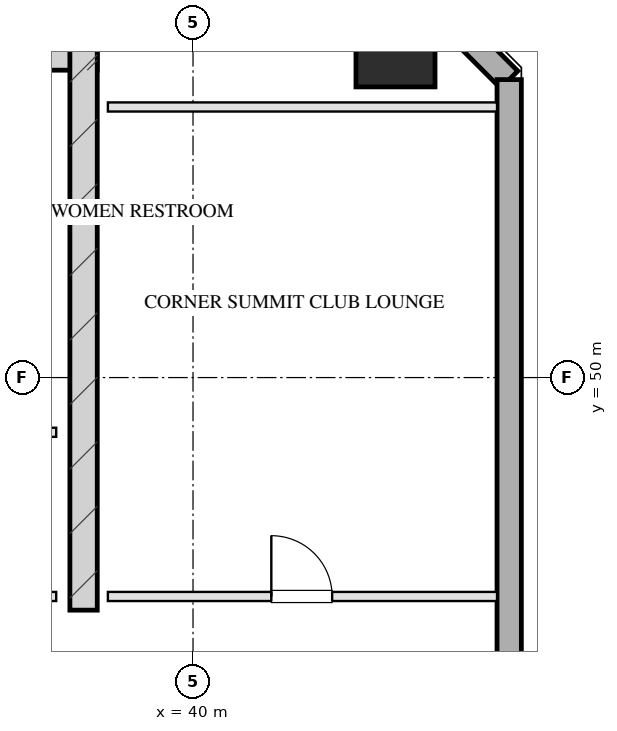
"""IFC4 building model, lengths in metres.
Left out: names, types, materials, properties, quantities, classifications, styles, units other than length and angle.
Written with IfcOpenShell. Run it as: python <this file> out.ifc"""

import sys

from ifc_helpers import new_model, si_unit, direction, frame, frame_2d, origin, origin_2d, place, context, subcontext, project, spatial, rectangle, hollow_rectangle, extrude, element, fill, save


model = new_model("IFC4")
c1 = context("Model", 3, precision=1e-05, world=origin(), true_north=direction((0.0, 1.0)))
c2 = subcontext(c1, "Body", "Model", "MODEL_VIEW")
j1 = project(units=[si_unit("LENGTHUNIT", "METRE"), si_unit("PLANEANGLEUNIT", "RADIAN")], contexts=[c1])
p1 = place(None, origin())
s1 = spatial("IfcSite", under=j1, at=p1, CompositionType="ELEMENT")
p2 = place(p1, origin())
s2 = spatial("IfcBuilding", under=s1, at=p2, CompositionType="ELEMENT")
p3 = place(p2, frame((0.0, 0.0, 272.8)))
s3 = spatial("IfcBuildingStorey", under=s2, at=p3, CompositionType="ELEMENT", Elevation=272.8)
p4 = place(p3, frame((21.575, 55.28, 0.0), z_axis=(0.0, 0.0, 1.0), x_axis=(1.0, 0.0, 0.0)))
e1 = element("IfcWall", 1, at=p4, inside=s3, PredefinedType="SHEAR", context=c2, shape_type="SweptSolid", body=[
    extrude(rectangle(XDim=16.85, YDim=0.45, at=frame_2d((8.425, 0.0))), origin(), (0.0, 0.0, 1.0), 3.2),
])
p5 = place(p3, frame((38.2, 46.175, 0.0), z_axis=(0.0, 0.0, 1.0), x_axis=(0.0, 1.0, 0.0)))
e2 = element("IfcWall", 2, at=p5, inside=s3, PredefinedType="SHEAR", context=c2, shape_type="SweptSolid", body=[
    extrude(rectangle(XDim=9.33, YDim=0.45, at=frame_2d((4.665, 0.0))), origin(), (0.0, 0.0, 1.0), 3.2),
])
p6 = place(p3, frame((43.33, 55.43, 0.0), z_axis=(0.0, 0.0, 1.0), x_axis=(1.0, 0.0, 0.0)))
e3 = element("IfcColumn", 3, at=p6, inside=s3, PredefinedType="COLUMN", context=c2, shape_type="SweptSolid", body=[
    extrude(hollow_rectangle(XDim=1.3, YDim=1.3, WallThickness=0.045, at=origin_2d()), origin(), (0.0, 0.0, 1.0), 3.201),
])
p7 = place(p3, frame((42.8, 57.3, 0.0), z_axis=(0.0, 0.0, 1.0), x_axis=(0.707070815327, -0.707142745217, 0.0)))
e4 = element("IfcWall", 4, at=p7, inside=s3, PredefinedType="SOLIDWALL", context=c2, shape_type="SweptSolid", body=[
    extrude(rectangle(XDim=3.394, YDim=0.4, at=frame_2d((1.697, 0.0))), origin(), (0.0, 0.0, 1.0), 2.36),
])
p8 = place(p3, frame((45.2, 54.9, 0.0), z_axis=(0.0, 0.0, 1.0), x_axis=(0.0, -1.0, 0.0)))
e5 = element("IfcWall", 5, at=p8, inside=s3, PredefinedType="SOLIDWALL", context=c2, shape_type="SweptSolid", body=[
    extrude(rectangle(XDim=41.8, YDim=0.4, at=frame_2d((20.9, 0.0))), origin(), (0.0, 0.0, 1.0), 2.36),
])
p9 = place(p8, frame((26.325, 0.0, 0.75)))
e6 = element("IfcOpeningElement", 6, at=p9, cuts=e5, PredefinedType="OPENING", context=c2, shape_type="SweptSolid", body=[
    extrude(rectangle(XDim=1.95, YDim=1.21, at=frame_2d((0.975, 0.605))), frame((0.0, 0.21, 0.0), z_axis=(0.0, -1.0, 0.0), x_axis=(1.0, 0.0, 0.0)), (0.0, 0.0, 1.0), 0.42),
])
p10 = place(p8, frame((22.525, 0.0, 0.75)))
e7 = element("IfcOpeningElement", 7, at=p10, cuts=e5, PredefinedType="OPENING", context=c2, shape_type="SweptSolid", body=[
    extrude(rectangle(XDim=1.95, YDim=1.21, at=frame_2d((0.975, 0.605))), frame((0.0, 0.21, 0.0), z_axis=(0.0, -1.0, 0.0), x_axis=(1.0, 0.0, 0.0)), (0.0, 0.0, 1.0), 0.42),
])
p11 = place(p8, frame((17.325, 0.0, 0.75)))
e8 = element("IfcOpeningElement", 8, at=p11, cuts=e5, PredefinedType="OPENING", context=c2, shape_type="SweptSolid", body=[
    extrude(rectangle(XDim=1.95, YDim=1.21, at=frame_2d((0.975, 0.605))), frame((0.0, 0.21, 0.0), z_axis=(0.0, -1.0, 0.0), x_axis=(1.0, 0.0, 0.0)), (0.0, 0.0, 1.0), 0.42),
])
p12 = place(p8, frame((13.525, 0.0, 0.75)))
e9 = element("IfcOpeningElement", 9, at=p12, cuts=e5, PredefinedType="OPENING", context=c2, shape_type="SweptSolid", body=[
    extrude(rectangle(XDim=1.95, YDim=1.21, at=frame_2d((0.975, 0.605))), frame((0.0, 0.21, 0.0), z_axis=(0.0, -1.0, 0.0), x_axis=(1.0, 0.0, 0.0)), (0.0, 0.0, 1.0), 0.42),
])
p13 = place(p3, frame((33.95, 46.4, 0.0), z_axis=(0.0, 0.0, 1.0), x_axis=(1.0, 0.0, 0.0)))
e10 = element("IfcWall", 10, at=p13, inside=s3, PredefinedType="PARTITIONING", context=c2, shape_type="SweptSolid", body=[
    extrude(rectangle(XDim=3.8, YDim=0.15, at=frame_2d((1.9, 0.0))), origin(), (0.0, 0.0, 1.0), 2.925),
])
p14 = place(p13, frame((0.45, 0.0, 0.0)))
e11 = element("IfcOpeningElement", 11, at=p14, cuts=e10, PredefinedType="OPENING", context=c2, shape_type="SweptSolid", body=[
    extrude(rectangle(XDim=0.95, YDim=2.05, at=frame_2d((0.475, 1.025))), frame((0.0, 0.085, 0.0), z_axis=(0.0, -1.0, 0.0), x_axis=(1.0, 0.0, 0.0)), (0.0, 0.0, 1.0), 0.17),
])
p15 = place(p3, frame((33.95, 49.1, 0.0), z_axis=(0.0, 0.0, 1.0), x_axis=(1.0, 0.0, 0.0)))
e12 = element("IfcWall", 12, at=p15, inside=s3, PredefinedType="PARTITIONING", context=c2, shape_type="SweptSolid", body=[
    extrude(rectangle(XDim=3.8, YDim=0.15, at=frame_2d((1.9, 0.0))), origin(), (0.0, 0.0, 1.0), 2.925),
])
p16 = place(p15, frame((0.35, 0.0, 0.0)))
e13 = element("IfcOpeningElement", 13, at=p16, cuts=e12, PredefinedType="OPENING", context=c2, shape_type="SweptSolid", body=[
    extrude(rectangle(XDim=0.9, YDim=2.05, at=frame_2d((0.45, 1.025))), frame((0.0, 0.085, 0.0), z_axis=(0.0, -1.0, 0.0), x_axis=(1.0, 0.0, 0.0)), (0.0, 0.0, 1.0), 0.17),
])
p17 = place(p15, frame((2.1, 0.0, 0.0)))
e14 = element("IfcOpeningElement", 14, at=p17, cuts=e12, PredefinedType="OPENING", context=c2, shape_type="SweptSolid", body=[
    extrude(rectangle(XDim=0.9, YDim=2.05, at=frame_2d((0.45, 1.025))), frame((0.0, 0.085, 0.0), z_axis=(0.0, -1.0, 0.0), x_axis=(1.0, 0.0, 0.0)), (0.0, 0.0, 1.0), 0.17),
])
p18 = place(p3, frame((38.6, 54.45, 0.0), z_axis=(0.0, 0.0, 1.0), x_axis=(1.0, 0.0, 0.0)))
e15 = element("IfcWall", 15, at=p18, inside=s3, PredefinedType="PARTITIONING", context=c2, shape_type="SweptSolid", body=[
    extrude(rectangle(XDim=6.4, YDim=0.15, at=frame_2d((3.2, 0.0))), origin(), (0.0, 0.0, 1.0), 2.925),
])
p19 = place(p3, frame((38.6, 46.4, 0.0), z_axis=(0.0, 0.0, 1.0), x_axis=(1.0, 0.0, 0.0)))
e16 = element("IfcWall", 16, at=p19, inside=s3, PredefinedType="PARTITIONING", context=c2, shape_type="SweptSolid", body=[
    extrude(rectangle(XDim=6.4, YDim=0.15, at=frame_2d((3.2, 0.0))), origin(), (0.0, 0.0, 1.0), 2.925),
])
p20 = place(p19, frame((2.688, 0.0, 0.0)))
e17 = element("IfcOpeningElement", 17, at=p20, cuts=e16, PredefinedType="OPENING", context=c2, shape_type="SweptSolid", body=[
    extrude(rectangle(XDim=1.0, YDim=2.05, at=frame_2d((0.5, 1.025))), frame((0.0, 0.085, 0.0), z_axis=(0.0, -1.0, 0.0), x_axis=(1.0, 0.0, 0.0)), (0.0, 0.0, 1.0), 0.17),
])
p21 = place(p20, origin())
e18 = element("IfcDoor", 18, at=p21, inside=s3, OperationType="SINGLE_SWING_LEFT", PredefinedType="DOOR", context=c2, shape_type="SweptSolid", body=[
    extrude(rectangle(XDim=1.0, YDim=2.05, at=frame_2d((0.5, 1.025))), frame((0.0, 0.025, 0.0), z_axis=(0.0, -1.0, 0.0), x_axis=(1.0, 0.0, 0.0)), (0.0, 0.0, 1.0), 0.05),
])
fill(e17, e18)
save(model, sys.argv[1])
